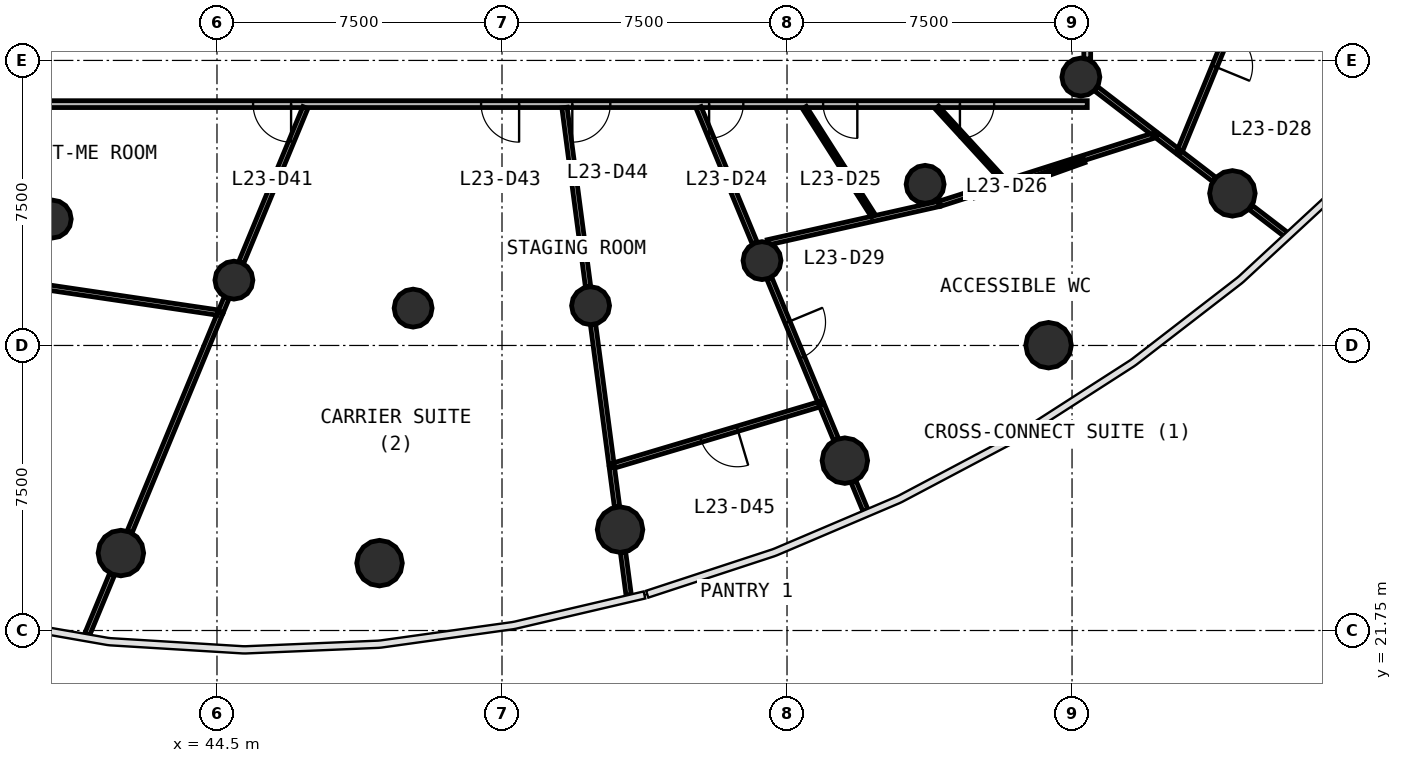
"""IFC4 building model, lengths in metres.
Left out: names, types, materials, properties, quantities, classifications, styles, units other than length and angle.
Written with IfcOpenShell. Run it as: python <this file> out.ifc"""

import sys

from ifc_helpers import new_model, si_unit, direction, frame, frame_2d, origin, origin_2d, place, context, subcontext, project, spatial, rectangle, circle, extrude, source, transform, mapped, element, fill, save


model = new_model("IFC4")
c1 = context("Model", 3, precision=1e-05, world=origin(), true_north=direction((0.0, 1.0)))
c2 = subcontext(c1, "Body", "Model", "MODEL_VIEW")
j1 = project(units=[si_unit("LENGTHUNIT", "METRE"), si_unit("PLANEANGLEUNIT", "RADIAN")], contexts=[c1])
p1 = place(None, origin())
s1 = spatial("IfcSite", under=j1, at=p1, CompositionType="ELEMENT")
p2 = place(p1, origin())
s2 = spatial("IfcBuilding", under=s1, at=p2, CompositionType="ELEMENT")
p3 = place(p2, frame((0.0, 0.0, 100.3)))
s3 = spatial("IfcBuildingStorey", under=s2, at=p3, CompositionType="ELEMENT", Elevation=100.3)
m1 = source(origin(), c2, "Body", "SweptSolid", [
    extrude(circle(Radius=0.6, at=origin_2d()), origin(), (0.0, 0.0, 1.0), 4.1),
])
for number, where, z_axis, x_axis in (
    (1, (41.971, 23.788, 0.0), (0.0, 0.0, 1.0), (1.0, 0.0, 0.0)),
    (2, (48.778, 23.523, 0.0), (0.0, 0.0, 1.0), (1.0, 0.0, 0.0)),
    (3, (55.106, 24.405, 0.0), (0.0, 0.0, 1.0), (1.0, 0.0, 0.0)),
    (4, (61.022, 26.219, 0.0), (0.0, 0.0, 1.0), (1.0, 0.0, 0.0)),
    (5, (66.382, 29.257, 0.0), (0.0, 0.0, 1.0), (1.0, 0.0, 0.0)),
    (6, (71.22, 33.252, 0.0), (0.0, 0.0, 1.0), (1.0, 0.0, 0.0)),
):
    element("IfcColumn", number, at=place(p3, frame(where, z_axis=z_axis, x_axis=x_axis)), inside=s3, PredefinedType="COLUMN", context=c2, shape_type="MappedRepresentation", body=[
        mapped(m1, transform((0.0, 0.0, 0.0), scale=1.0)),
    ])
m2 = source(origin(), c2, "Body", "SweptSolid", [
    extrude(circle(Radius=0.5, at=origin_2d()), origin(), (0.0, 0.0, 1.0), 4.1),
])
for number, where, z_axis, x_axis in (
    (7, (40.165, 32.576, 0.0), (0.0, 0.0, 1.0), (1.0, 0.0, 0.0)),
    (8, (44.945, 30.969, 0.0), (0.0, 0.0, 1.0), (1.0, 0.0, 0.0)),
    (9, (49.661, 30.233, 0.0), (0.0, 0.0, 1.0), (1.0, 0.0, 0.0)),
    (10, (54.331, 30.297, 0.0), (0.0, 0.0, 1.0), (1.0, 0.0, 0.0)),
    (11, (58.842, 31.482, 0.0), (0.0, 0.0, 1.0), (1.0, 0.0, 0.0)),
    (12, (63.134, 33.49, 0.0), (0.0, 0.0, 1.0), (1.0, 0.0, 0.0)),
    (13, (67.232, 36.312, 0.0), (0.0, 0.0, 1.0), (1.0, 0.0, 0.0)),
):
    element("IfcColumn", number, at=place(p3, frame(where, z_axis=z_axis, x_axis=x_axis)), inside=s3, PredefinedType="COLUMN", context=c2, shape_type="MappedRepresentation", body=[
        mapped(m2, transform((0.0, 0.0, 0.0), scale=1.0)),
    ])
p4 = place(p3, frame((67.4, 35.6, 0.0), z_axis=(0.0, 0.0, 1.0), x_axis=(-1.0, 0.0, 0.0)))
e14 = element("IfcWall", 14, at=p4, inside=s3, PredefinedType="PARTITIONING", context=c2, shape_type="SweptSolid", body=[
    extrude(rectangle(XDim=30.8, YDim=0.18, at=frame_2d((15.4, 0.0))), origin(), (0.0, 0.0, 1.0), 2.9),
])
p5 = place(p4, frame((9.05, 0.0, 0.0)))
e15 = element("IfcOpeningElement", 15, at=p5, cuts=e14, PredefinedType="OPENING", context=c2, shape_type="SweptSolid", body=[
    extrude(rectangle(XDim=0.9, YDim=2.1, at=frame_2d((0.45, 1.05))), frame((0.0, 0.1, 0.0), z_axis=(0.0, -1.0, 0.0), x_axis=(1.0, 0.0, 0.0)), (0.0, 0.0, 1.0), 0.2),
])
p6 = place(p4, frame((6.05, 0.0, 0.0)))
e16 = element("IfcOpeningElement", 16, at=p6, cuts=e14, PredefinedType="OPENING", context=c2, shape_type="SweptSolid", body=[
    extrude(rectangle(XDim=0.9, YDim=2.1, at=frame_2d((0.45, 1.05))), frame((0.0, 0.1, 0.0), z_axis=(0.0, -1.0, 0.0), x_axis=(1.0, 0.0, 0.0)), (0.0, 0.0, 1.0), 0.2),
])
p7 = place(p4, frame((2.45, 0.0, 0.0)))
e17 = element("IfcOpeningElement", 17, at=p7, cuts=e14, PredefinedType="OPENING", context=c2, shape_type="SweptSolid", body=[
    extrude(rectangle(XDim=0.9, YDim=2.1, at=frame_2d((0.45, 1.05))), frame((0.0, 0.1, 0.0), z_axis=(0.0, -1.0, 0.0), x_axis=(1.0, 0.0, 0.0)), (0.0, 0.0, 1.0), 0.2),
])
p8 = place(p4, frame((20.95, 0.0, 0.0)))
e18 = element("IfcOpeningElement", 18, at=p8, cuts=e14, PredefinedType="OPENING", context=c2, shape_type="SweptSolid", body=[
    extrude(rectangle(XDim=1.0, YDim=2.1, at=frame_2d((0.5, 1.05))), frame((0.0, 0.1, 0.0), z_axis=(0.0, -1.0, 0.0), x_axis=(1.0, 0.0, 0.0)), (0.0, 0.0, 1.0), 0.2),
])
p9 = place(p4, frame((14.95, 0.0, 0.0)))
e19 = element("IfcOpeningElement", 19, at=p9, cuts=e14, PredefinedType="OPENING", context=c2, shape_type="SweptSolid", body=[
    extrude(rectangle(XDim=1.0, YDim=2.1, at=frame_2d((0.5, 1.05))), frame((0.0, 0.1, 0.0), z_axis=(0.0, -1.0, 0.0), x_axis=(1.0, 0.0, 0.0)), (0.0, 0.0, 1.0), 0.2),
])
p10 = place(p4, frame((12.55, 0.0, 0.0)))
e20 = element("IfcOpeningElement", 20, at=p10, cuts=e14, PredefinedType="OPENING", context=c2, shape_type="SweptSolid", body=[
    extrude(rectangle(XDim=1.0, YDim=2.1, at=frame_2d((0.5, 1.05))), frame((0.0, 0.1, 0.0), z_axis=(0.0, -1.0, 0.0), x_axis=(1.0, 0.0, 0.0)), (0.0, 0.0, 1.0), 0.2),
])
p11 = place(p3, frame((67.4, 60.37, 0.0), z_axis=(0.0, 0.0, 1.0), x_axis=(0.0, -1.0, 0.0)))
e21 = element("IfcWall", 21, at=p11, inside=s3, PredefinedType="PARTITIONING", context=c2, shape_type="SweptSolid", body=[
    extrude(rectangle(XDim=23.583, YDim=0.18, at=frame_2d((11.791, 0.0))), origin(), (0.0, 0.0, 1.0), 2.9),
])
p12 = place(p11, frame((14.732, 0.0, 0.0)))
e22 = element("IfcOpeningElement", 22, at=p12, cuts=e21, PredefinedType="OPENING", context=c2, shape_type="SweptSolid", body=[
    extrude(rectangle(XDim=1.0, YDim=2.1, at=frame_2d((0.5, 1.05))), frame((0.0, 0.1, 0.0), z_axis=(0.0, -1.0, 0.0), x_axis=(1.0, 0.0, 0.0)), (0.0, 0.0, 1.0), 0.2),
])
p13 = place(p11, frame((11.333, 0.0, 0.0)))
e23 = element("IfcOpeningElement", 23, at=p13, cuts=e21, PredefinedType="OPENING", context=c2, shape_type="SweptSolid", body=[
    extrude(rectangle(XDim=1.0, YDim=2.1, at=frame_2d((0.5, 1.05))), frame((0.0, 0.1, 0.0), z_axis=(0.0, -1.0, 0.0), x_axis=(1.0, 0.0, 0.0)), (0.0, 0.0, 1.0), 0.2),
])
p14 = place(p11, frame((4.532, 0.0, 0.0)))
e24 = element("IfcOpeningElement", 24, at=p14, cuts=e21, PredefinedType="OPENING", context=c2, shape_type="SweptSolid", body=[
    extrude(rectangle(XDim=1.0, YDim=2.1, at=frame_2d((0.5, 1.05))), frame((0.0, 0.1, 0.0), z_axis=(0.0, -1.0, 0.0), x_axis=(1.0, 0.0, 0.0)), (0.0, 0.0, 1.0), 0.2),
])
p15 = place(p3, frame((44.588, 30.106, 0.0), z_axis=(0.0, 0.0, 1.0), x_axis=(-0.382687319502, -0.923877922397, 0.0)))
e25 = element("IfcWall", 25, at=p15, inside=s3, PredefinedType="PARTITIONING", context=c2, shape_type="SweptSolid", body=[
    extrude(rectangle(XDim=6.234, YDim=0.14, at=frame_2d((3.117, 0.0))), origin(), (0.0, 0.0, 1.0), 2.9),
])
p16 = place(p3, frame((63.525, 32.98, 0.0), z_axis=(0.0, 0.0, 1.0), x_axis=(0.952796236259, 0.303610494172, 0.0)))
e26 = element("IfcWall", 26, at=p16, inside=s3, PredefinedType="PARTITIONING", context=c2, shape_type="SweptSolid", body=[
    extrude(rectangle(XDim=5.969, YDim=0.14, at=frame_2d((2.984, 0.0))), origin(), (0.0, 0.0, 1.0), 2.9),
])
p17 = place(p3, frame((72.028, 39.704, 0.0), z_axis=(0.0, 0.0, 1.0), x_axis=(-0.380042060719, -0.92496920602, 0.0)))
e27 = element("IfcWall", 27, at=p17, inside=s3, PredefinedType="PARTITIONING", context=c2, shape_type="SweptSolid", body=[
    extrude(rectangle(XDim=5.813, YDim=0.14, at=frame_2d((2.907, 0.0))), origin(), (0.0, 0.0, 1.0), 2.9),
])
p18 = place(p17, frame((2.363, 0.0, 0.0)))
e28 = element("IfcOpeningElement", 28, at=p18, cuts=e27, PredefinedType="OPENING", context=c2, shape_type="SweptSolid", body=[
    extrude(rectangle(XDim=1.0, YDim=2.1, at=frame_2d((0.5, 1.05))), frame((0.0, 0.08, 0.0), z_axis=(0.0, -1.0, 0.0), x_axis=(1.0, 0.0, 0.0)), (0.0, 0.0, 1.0), 0.16),
])
p19 = place(p3, frame((60.402, 27.716, 0.0), z_axis=(0.0, 0.0, 1.0), x_axis=(-0.958396549516, -0.285440105584, 0.0)))
e29 = element("IfcWall", 29, at=p19, inside=s3, PredefinedType="PARTITIONING", context=c2, shape_type="SweptSolid", body=[
    extrude(rectangle(XDim=5.755, YDim=0.14, at=frame_2d((2.877, 0.0))), origin(), (0.0, 0.0, 1.0), 2.9),
])
p20 = place(p19, frame((2.304, 0.0, 0.0)))
e30 = element("IfcOpeningElement", 30, at=p20, cuts=e29, PredefinedType="OPENING", context=c2, shape_type="SweptSolid", body=[
    extrude(rectangle(XDim=1.0, YDim=2.1, at=frame_2d((0.5, 1.05))), frame((0.0, 0.08, 0.0), z_axis=(0.0, -1.0, 0.0), x_axis=(1.0, 0.0, 0.0)), (0.0, 0.0, 1.0), 0.16),
])
p21 = place(p3, frame((38.943, 30.94, 0.0), z_axis=(0.0, 0.0, 1.0), x_axis=(0.98924251215, -0.146284832283, 0.0)))
e31 = element("IfcWall", 31, at=p21, inside=s3, PredefinedType="PARTITIONING", context=c2, shape_type="SweptSolid", body=[
    extrude(rectangle(XDim=5.634, YDim=0.14, at=frame_2d((2.817, 0.0))), origin(), (0.0, 0.0, 1.0), 2.9),
])
p22 = place(p3, frame((53.644, 35.51, 0.0), z_axis=(0.0, 0.0, 1.0), x_axis=(0.130548834981, -0.991441880135, 0.0)))
e32 = element("IfcWall", 32, at=p22, inside=s3, PredefinedType="PARTITIONING", context=c2, shape_type="SweptSolid", body=[
    extrude(rectangle(XDim=4.754, YDim=0.14, at=frame_2d((2.377, 0.0))), origin(), (0.0, 0.0, 1.0), 2.9),
])
p23 = place(p3, frame((58.994, 31.964, 0.0), z_axis=(0.0, 0.0, 1.0), x_axis=(0.975726638185, 0.218992071856, 0.0)))
e33 = element("IfcWall", 33, at=p23, inside=s3, PredefinedType="PARTITIONING", context=c2, shape_type="SweptSolid", body=[
    extrude(rectangle(XDim=4.613, YDim=0.14, at=frame_2d((2.307, 0.0))), origin(), (0.0, 0.0, 1.0), 2.9),
])
p24 = place(p3, frame((46.826, 35.51, 0.0), z_axis=(0.0, 0.0, 1.0), x_axis=(-0.382672831764, -0.923883923353, 0.0)))
e34 = element("IfcWall", 34, at=p24, inside=s3, PredefinedType="PARTITIONING", context=c2, shape_type="SweptSolid", body=[
    extrude(rectangle(XDim=4.41, YDim=0.14, at=frame_2d((2.205, 0.0))), origin(), (0.0, 0.0, 1.0), 2.9),
])
p25 = place(p3, frame((57.174, 35.51, 0.0), z_axis=(0.0, 0.0, 1.0), x_axis=(0.382644558062, -0.923895633817, 0.0)))
e35 = element("IfcWall", 35, at=p25, inside=s3, PredefinedType="PARTITIONING", context=c2, shape_type="SweptSolid", body=[
    extrude(rectangle(XDim=3.854, YDim=0.14, at=frame_2d((1.927, 0.0))), origin(), (0.0, 0.0, 1.0), 2.9),
])
p26 = place(p3, frame((54.396, 29.797, 0.0), z_axis=(0.0, 0.0, 1.0), x_axis=(0.13054879449, -0.991441885466, 0.0)))
e36 = element("IfcWall", 36, at=p26, inside=s3, PredefinedType="PARTITIONING", context=c2, shape_type="SweptSolid", body=[
    extrude(rectangle(XDim=3.684, YDim=0.14, at=frame_2d((1.842, 0.0))), origin(), (0.0, 0.0, 1.0), 2.9),
])
p27 = place(p3, frame((59.035, 31.016, 0.0), z_axis=(0.0, 0.0, 1.0), x_axis=(0.382713118167, -0.923867235691, 0.0)))
e37 = element("IfcWall", 37, at=p27, inside=s3, PredefinedType="PARTITIONING", context=c2, shape_type="SweptSolid", body=[
    extrude(rectangle(XDim=3.501, YDim=0.14, at=frame_2d((1.75, 0.0))), origin(), (0.0, 0.0, 1.0), 2.9),
])
p28 = place(p27, frame((1.25, 0.0, 0.0)))
e38 = element("IfcOpeningElement", 38, at=p28, cuts=e37, PredefinedType="OPENING", context=c2, shape_type="SweptSolid", body=[
    extrude(rectangle(XDim=1.0, YDim=2.1, at=frame_2d((0.5, 1.05))), frame((0.0, 0.08, 0.0), z_axis=(0.0, -1.0, 0.0), x_axis=(1.0, 0.0, 0.0)), (0.0, 0.0, 1.0), 0.16),
])
p29 = place(p3, frame((67.633, 36.005, 0.0), z_axis=(0.0, 0.0, 1.0), x_axis=(0.79330932609, -0.608818785139, 0.0)))
e39 = element("IfcWall", 39, at=p29, inside=s3, PredefinedType="PARTITIONING", context=c2, shape_type="SweptSolid", body=[
    extrude(rectangle(XDim=1.906, YDim=0.14, at=frame_2d((0.953, 0.0))), origin(), (0.0, 0.0, 1.0), 2.9),
])
p30 = place(p3, frame((41.74, 23.229, 0.0), z_axis=(0.0, 0.0, 1.0), x_axis=(-0.382769756697, -0.923843771077, 0.0)))
e40 = element("IfcWall", 40, at=p30, inside=s3, PredefinedType="PARTITIONING", context=c2, shape_type="SweptSolid", body=[
    extrude(rectangle(XDim=1.719, YDim=0.14, at=frame_2d((0.86, 0.0))), origin(), (0.0, 0.0, 1.0), 2.9),
])
p31 = place(p3, frame((71.699, 32.884, 0.0), z_axis=(0.0, 0.0, 1.0), x_axis=(0.793332880396, -0.608788091935, 0.0)))
e41 = element("IfcWall", 41, at=p31, inside=s3, PredefinedType="PARTITIONING", context=c2, shape_type="SweptSolid", body=[
    extrude(rectangle(XDim=1.164, YDim=0.14, at=frame_2d((0.582, 0.0))), origin(), (0.0, 0.0, 1.0), 2.9),
])
for number, where, z_axis, x_axis in (
    (42, (69.843, 34.309, 0.0), (0.0, 0.0, 1.0), (0.793, -0.609, 0.0)),
    (43, (55.185, 23.805, 0.0), (0.0, 0.0, 1.0), (0.131, -0.991, 0.0)),
):
    element("IfcWall", number, at=place(p3, frame(where, z_axis=z_axis, x_axis=x_axis)), inside=s3, PredefinedType="PARTITIONING", context=c2, shape_type="SweptSolid", body=[
        extrude(rectangle(XDim=1.131, YDim=0.14, at=frame_2d((0.566, 0.0))), origin(), (0.0, 0.0, 1.0), 2.9),
    ])
p32 = place(p3, frame((54.891, 26.044, 0.0), z_axis=(0.0, 0.0, 1.0), x_axis=(0.130562877322, -0.991440030998, 0.0)))
e44 = element("IfcWall", 44, at=p32, inside=s3, PredefinedType="PARTITIONING", context=c2, shape_type="SweptSolid", body=[
    extrude(rectangle(XDim=1.049, YDim=0.14, at=frame_2d((0.524, 0.0))), origin(), (0.0, 0.0, 1.0), 2.9),
])
p33 = place(p3, frame((60.413, 27.689, 0.0), z_axis=(0.0, 0.0, 1.0), x_axis=(0.382767514508, -0.923844700065, 0.0)))
e45 = element("IfcWall", 45, at=p33, inside=s3, PredefinedType="PARTITIONING", context=c2, shape_type="SweptSolid", body=[
    extrude(rectangle(XDim=0.985, YDim=0.14, at=frame_2d((0.493, 0.0))), origin(), (0.0, 0.0, 1.0), 2.9),
])
p34 = place(p3, frame((61.253, 25.66, 0.0), z_axis=(0.0, 0.0, 1.0), x_axis=(0.382520140646, -0.923947153251, 0.0)))
e46 = element("IfcWall", 46, at=p34, inside=s3, PredefinedType="PARTITIONING", context=c2, shape_type="SweptSolid", body=[
    extrude(rectangle(XDim=0.811, YDim=0.14, at=frame_2d((0.406, 0.0))), origin(), (0.0, 0.0, 1.0), 2.9),
])
p35 = place(p3, frame((69.236, 34.774, 0.0), z_axis=(0.0, 0.0, 1.0), x_axis=(0.793363129336, -0.608748671465, 0.0)))
e47 = element("IfcWall", 47, at=p35, inside=s3, PredefinedType="PARTITIONING", context=c2, shape_type="SweptSolid", body=[
    extrude(rectangle(XDim=0.663, YDim=0.14, at=frame_2d((0.331, 0.0))), origin(), (0.0, 0.0, 1.0), 2.9),
])
p36 = place(p3, frame((44.752, 30.502, 0.0), z_axis=(0.0, 0.0, 1.0), x_axis=(-0.382441868588, -0.923979554509, 0.0)))
e48 = element("IfcWall", 48, at=p36, inside=s3, PredefinedType="PARTITIONING", context=c2, shape_type="SweptSolid", body=[
    extrude(rectangle(XDim=0.399, YDim=0.14, at=frame_2d((0.199, 0.0))), origin(), (0.0, 0.0, 1.0), 2.9),
])
p37 = place(p3, frame((65.363, 33.417, 0.0), z_axis=(0.0, 0.0, 1.0), x_axis=(0.941622213284, 0.336671364166, 0.0)))
e49 = element("IfcWall", 49, at=p37, inside=s3, PredefinedType="PARTITIONING", context=c2, shape_type="SweptSolid", body=[
    extrude(rectangle(XDim=2.078, YDim=0.12, at=frame_2d((1.039, 0.0))), origin(), (0.0, 0.0, 1.0), 2.9),
])
p38 = place(p3, frame((59.957, 35.51, 0.0), z_axis=(0.0, 0.0, 1.0), x_axis=(0.53729604105, -0.843393718421, 0.0)))
e50 = element("IfcWall", 50, at=p38, inside=s3, PredefinedType="PARTITIONING", context=c2, shape_type="SweptSolid", body=[
    extrude(rectangle(XDim=3.38, YDim=0.12, at=frame_2d((1.69, 0.0))), origin(), (0.0, 0.0, 1.0), 2.9),
])
p39 = place(p3, frame((63.445, 35.51, 0.0), z_axis=(0.0, 0.0, 1.0), x_axis=(0.675550604447, -0.737313624471, 0.0)))
e51 = element("IfcWall", 51, at=p39, inside=s3, PredefinedType="PARTITIONING", context=c2, shape_type="SweptSolid", body=[
    extrude(rectangle(XDim=2.605, YDim=0.12, at=frame_2d((1.302, 0.0))), origin(), (0.0, 0.0, 1.0), 2.9),
])
p40 = place(p3, frame((64.429, 33.195, 0.0), z_axis=(0.0, 0.0, 1.0), x_axis=(0.972960885816, 0.230969943221, 0.0)))
e52 = element("IfcWall", 52, at=p40, inside=s3, PredefinedType="PARTITIONING", context=c2, shape_type="SweptSolid", body=[
    extrude(rectangle(XDim=0.93, YDim=0.12, at=frame_2d((0.465, 0.0))), origin(), (0.0, 0.0, 1.0), 2.9),
])
m3 = source(origin(), c2, "Body", "SweptSolid", [
    extrude(rectangle(XDim=0.9, YDim=2.1, at=frame_2d((0.45, 1.05))), frame((0.0, 0.025, 0.0), z_axis=(0.0, -1.0, 0.0), x_axis=(1.0, 0.0, 0.0)), (0.0, 0.0, 1.0), 0.05),
])
p41 = place(p5, origin())
e53 = element("IfcDoor", 53, at=p41, inside=s3, OperationType="SINGLE_SWING_RIGHT", PredefinedType="DOOR", context=c2, shape_type="MappedRepresentation", body=[
    mapped(m3, transform((0.0, 0.0, 0.0), scale=1.0)),
])
fill(e15, e53)
p42 = place(p6, origin())
e54 = element("IfcDoor", 54, at=p42, inside=s3, OperationType="SINGLE_SWING_LEFT", PredefinedType="DOOR", context=c2, shape_type="MappedRepresentation", body=[
    mapped(m3, transform((0.0, 0.0, 0.0), scale=1.0)),
])
fill(e16, e54)
p43 = place(p7, origin())
e55 = element("IfcDoor", 55, at=p43, inside=s3, OperationType="SINGLE_SWING_RIGHT", PredefinedType="DOOR", context=c2, shape_type="MappedRepresentation", body=[
    mapped(m3, transform((0.0, 0.0, 0.0), scale=1.0)),
])
fill(e17, e55)
m4 = source(origin(), c2, "Body", "SweptSolid", [
    extrude(rectangle(XDim=1.0, YDim=2.1, at=frame_2d((0.5, 1.05))), frame((0.0, 0.025, 0.0), z_axis=(0.0, -1.0, 0.0), x_axis=(1.0, 0.0, 0.0)), (0.0, 0.0, 1.0), 0.05),
])
p44 = place(p18, origin())
e56 = element("IfcDoor", 56, at=p44, inside=s3, OperationType="SINGLE_SWING_RIGHT", PredefinedType="DOOR", context=c2, shape_type="MappedRepresentation", body=[
    mapped(m4, transform((0.0, 0.0, 0.0), scale=1.0)),
])
fill(e28, e56)
p45 = place(p28, origin())
e57 = element("IfcDoor", 57, at=p45, inside=s3, OperationType="SINGLE_SWING_LEFT", PredefinedType="DOOR", context=c2, shape_type="MappedRepresentation", body=[
    mapped(m4, transform((0.0, 0.0, 0.0), scale=1.0)),
])
fill(e38, e57)
p46 = place(p8, origin())
e58 = element("IfcDoor", 58, at=p46, inside=s3, OperationType="SINGLE_SWING_LEFT", PredefinedType="DOOR", context=c2, shape_type="MappedRepresentation", body=[
    mapped(m4, transform((0.0, 0.0, 0.0), scale=1.0)),
])
fill(e18, e58)
p47 = place(p9, origin())
e59 = element("IfcDoor", 59, at=p47, inside=s3, OperationType="SINGLE_SWING_LEFT", PredefinedType="DOOR", context=c2, shape_type="MappedRepresentation", body=[
    mapped(m4, transform((0.0, 0.0, 0.0), scale=1.0)),
])
fill(e19, e59)
p48 = place(p10, origin())
e60 = element("IfcDoor", 60, at=p48, inside=s3, OperationType="SINGLE_SWING_RIGHT", PredefinedType="DOOR", context=c2, shape_type="MappedRepresentation", body=[
    mapped(m4, transform((0.0, 0.0, 0.0), scale=1.0)),
])
fill(e20, e60)
p49 = place(p20, origin())
e61 = element("IfcDoor", 61, at=p49, inside=s3, OperationType="SINGLE_SWING_LEFT", PredefinedType="DOOR", context=c2, shape_type="MappedRepresentation", body=[
    mapped(m4, transform((0.0, 0.0, 0.0), scale=1.0)),
])
fill(e30, e61)
save(model, sys.argv[1])
